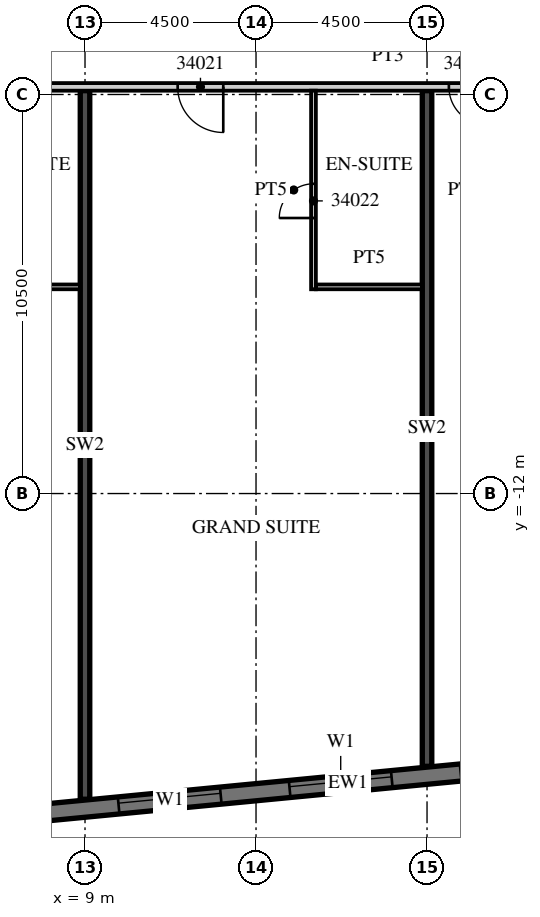
"""IFC4 building model, lengths in metres.
Left out: names, types, materials, properties, quantities, classifications, styles, units other than length and angle.
Written with IfcOpenShell. Run it as: python <this file> out.ifc"""

import sys

from ifc_helpers import new_model, si_unit, direction, frame, frame_2d, origin, place, context, subcontext, project, spatial, rectangle, extrude, element, fill, save


model = new_model("IFC4")
c1 = context("Model", 3, precision=1e-05, world=origin(), true_north=direction((0.0, 1.0)))
c2 = subcontext(c1, "Body", "Model", "MODEL_VIEW")
j1 = project(units=[si_unit("LENGTHUNIT", "METRE"), si_unit("PLANEANGLEUNIT", "RADIAN")], contexts=[c1])
p1 = place(None, origin())
s1 = spatial("IfcSite", under=j1, at=p1, CompositionType="ELEMENT")
p2 = place(p1, origin())
s2 = spatial("IfcBuilding", under=s1, at=p2, CompositionType="ELEMENT")
p3 = place(p2, frame((0.0, 0.0, 147.1)))
s3 = spatial("IfcBuildingStorey", under=s2, at=p3, CompositionType="ELEMENT", Elevation=147.1)
p4 = place(p3, frame((9.0, -20.044, 0.0), z_axis=(0.0, 0.0, 1.0), x_axis=(0.0, 1.0, 0.0)))
e1 = element("IfcWall", 1, at=p4, inside=s3, PredefinedType="SHEAR", context=c2, shape_type="SweptSolid", body=[
    extrude(rectangle(XDim=18.644, YDim=0.25, at=frame_2d((9.322, 0.0))), origin(), (0.0, 0.0, 1.0), 3.0),
])
p5 = place(p3, frame((18.0, -19.177, 0.0), z_axis=(0.0, 0.0, 1.0), x_axis=(0.0, 1.0, 0.0)))
e2 = element("IfcWall", 2, at=p5, inside=s3, PredefinedType="SHEAR", context=c2, shape_type="SweptSolid", body=[
    extrude(rectangle(XDim=17.777, YDim=0.25, at=frame_2d((8.889, 0.0))), origin(), (0.0, 0.0, 1.0), 3.0),
])
p6 = place(p3, frame((-13.521, -22.46, 0.0), z_axis=(0.0, 0.0, 1.0), x_axis=(0.995396096335, 0.095846812164, 0.0)))
e3 = element("IfcWall", 3, at=p6, inside=s3, PredefinedType="SOLIDWALL", context=c2, shape_type="SweptSolid", body=[
    extrude(rectangle(XDim=59.151, YDim=0.45, at=frame_2d((29.575, 0.0))), origin(), (0.0, 0.0, 1.0), 3.0),
])
p7 = place(p6, frame((0.91, 0.0, 0.45)))
e4 = element("IfcOpeningElement", 4, at=p7, cuts=e3, PredefinedType="OPENING", context=c2, shape_type="SweptSolid", body=[
    extrude(rectangle(XDim=2.7, YDim=2.25, at=frame_2d((1.35, 1.125))), frame((0.0, 0.235, 0.0), z_axis=(0.0, -1.0, 0.0), x_axis=(1.0, 0.0, 0.0)), (0.0, 0.0, 1.0), 0.47),
])
p8 = place(p6, frame((5.431, 0.0, 0.45)))
e5 = element("IfcOpeningElement", 5, at=p8, cuts=e3, PredefinedType="OPENING", context=c2, shape_type="SweptSolid", body=[
    extrude(rectangle(XDim=2.7, YDim=2.25, at=frame_2d((1.35, 1.125))), frame((0.0, 0.235, 0.0), z_axis=(0.0, -1.0, 0.0), x_axis=(1.0, 0.0, 0.0)), (0.0, 0.0, 1.0), 0.47),
])
p9 = place(p6, frame((9.952, 0.0, 0.45)))
e6 = element("IfcOpeningElement", 6, at=p9, cuts=e3, PredefinedType="OPENING", context=c2, shape_type="SweptSolid", body=[
    extrude(rectangle(XDim=2.7, YDim=2.25, at=frame_2d((1.35, 1.125))), frame((0.0, 0.235, 0.0), z_axis=(0.0, -1.0, 0.0), x_axis=(1.0, 0.0, 0.0)), (0.0, 0.0, 1.0), 0.47),
])
p10 = place(p6, frame((14.473, 0.0, 0.45)))
e7 = element("IfcOpeningElement", 7, at=p10, cuts=e3, PredefinedType="OPENING", context=c2, shape_type="SweptSolid", body=[
    extrude(rectangle(XDim=2.7, YDim=2.25, at=frame_2d((1.35, 1.125))), frame((0.0, 0.235, 0.0), z_axis=(0.0, -1.0, 0.0), x_axis=(1.0, 0.0, 0.0)), (0.0, 0.0, 1.0), 0.47),
])
p11 = place(p6, frame((18.994, 0.0, 0.45)))
e8 = element("IfcOpeningElement", 8, at=p11, cuts=e3, PredefinedType="OPENING", context=c2, shape_type="SweptSolid", body=[
    extrude(rectangle(XDim=2.7, YDim=2.25, at=frame_2d((1.35, 1.125))), frame((0.0, 0.235, 0.0), z_axis=(0.0, -1.0, 0.0), x_axis=(1.0, 0.0, 0.0)), (0.0, 0.0, 1.0), 0.47),
])
p12 = place(p6, frame((23.514, 0.0, 0.45)))
e9 = element("IfcOpeningElement", 9, at=p12, cuts=e3, PredefinedType="OPENING", context=c2, shape_type="SweptSolid", body=[
    extrude(rectangle(XDim=2.7, YDim=2.25, at=frame_2d((1.35, 1.125))), frame((0.0, 0.235, 0.0), z_axis=(0.0, -1.0, 0.0), x_axis=(1.0, 0.0, 0.0)), (0.0, 0.0, 1.0), 0.47),
])
p13 = place(p6, frame((28.035, 0.0, 0.45)))
e10 = element("IfcOpeningElement", 10, at=p13, cuts=e3, PredefinedType="OPENING", context=c2, shape_type="SweptSolid", body=[
    extrude(rectangle(XDim=2.7, YDim=2.25, at=frame_2d((1.35, 1.125))), frame((0.0, 0.235, 0.0), z_axis=(0.0, -1.0, 0.0), x_axis=(1.0, 0.0, 0.0)), (0.0, 0.0, 1.0), 0.47),
])
p14 = place(p6, frame((32.556, 0.0, 0.45)))
e11 = element("IfcOpeningElement", 11, at=p14, cuts=e3, PredefinedType="OPENING", context=c2, shape_type="SweptSolid", body=[
    extrude(rectangle(XDim=2.7, YDim=2.25, at=frame_2d((1.35, 1.125))), frame((0.0, 0.235, 0.0), z_axis=(0.0, -1.0, 0.0), x_axis=(1.0, 0.0, 0.0)), (0.0, 0.0, 1.0), 0.47),
])
p15 = place(p6, frame((37.077, 0.0, 0.45)))
e12 = element("IfcOpeningElement", 12, at=p15, cuts=e3, PredefinedType="OPENING", context=c2, shape_type="SweptSolid", body=[
    extrude(rectangle(XDim=2.7, YDim=2.25, at=frame_2d((1.35, 1.125))), frame((0.0, 0.235, 0.0), z_axis=(0.0, -1.0, 0.0), x_axis=(1.0, 0.0, 0.0)), (0.0, 0.0, 1.0), 0.47),
])
p16 = place(p6, frame((41.598, 0.0, 0.45)))
e13 = element("IfcOpeningElement", 13, at=p16, cuts=e3, PredefinedType="OPENING", context=c2, shape_type="SweptSolid", body=[
    extrude(rectangle(XDim=2.7, YDim=2.25, at=frame_2d((1.35, 1.125))), frame((0.0, 0.235, 0.0), z_axis=(0.0, -1.0, 0.0), x_axis=(1.0, 0.0, 0.0)), (0.0, 0.0, 1.0), 0.47),
])
p17 = place(p6, frame((46.118, 0.0, 0.45)))
e14 = element("IfcOpeningElement", 14, at=p17, cuts=e3, PredefinedType="OPENING", context=c2, shape_type="SweptSolid", body=[
    extrude(rectangle(XDim=2.7, YDim=2.25, at=frame_2d((1.35, 1.125))), frame((0.0, 0.235, 0.0), z_axis=(0.0, -1.0, 0.0), x_axis=(1.0, 0.0, 0.0)), (0.0, 0.0, 1.0), 0.47),
])
p18 = place(p6, frame((50.639, 0.0, 0.45)))
e15 = element("IfcOpeningElement", 15, at=p18, cuts=e3, PredefinedType="OPENING", context=c2, shape_type="SweptSolid", body=[
    extrude(rectangle(XDim=2.7, YDim=2.25, at=frame_2d((1.35, 1.125))), frame((0.0, 0.235, 0.0), z_axis=(0.0, -1.0, 0.0), x_axis=(1.0, 0.0, 0.0)), (0.0, 0.0, 1.0), 0.47),
])
p19 = place(p6, frame((55.15, 0.0, 0.45)))
e16 = element("IfcOpeningElement", 16, at=p19, cuts=e3, PredefinedType="OPENING", context=c2, shape_type="SweptSolid", body=[
    extrude(rectangle(XDim=2.7, YDim=2.25, at=frame_2d((1.35, 1.125))), frame((0.0, 0.235, 0.0), z_axis=(0.0, -1.0, 0.0), x_axis=(1.0, 0.0, 0.0)), (0.0, 0.0, 1.0), 0.47),
])
p20 = place(p3, frame((-13.5, -1.3, 0.0), z_axis=(0.0, 0.0, 1.0), x_axis=(1.0, 0.0, 0.0)))
e17 = element("IfcWall", 17, at=p20, inside=s3, PredefinedType="PARTITIONING", context=c2, shape_type="SweptSolid", body=[
    extrude(rectangle(XDim=60.932, YDim=0.2, at=frame_2d((30.466, 0.0))), origin(), (0.0, 0.0, 1.0), 3.0),
])
p21 = place(p20, frame((2.925, 0.0, 0.0)))
e18 = element("IfcOpeningElement", 18, at=p21, cuts=e17, PredefinedType="OPENING", context=c2, shape_type="SweptSolid", body=[
    extrude(rectangle(XDim=1.0, YDim=2.1, at=frame_2d((0.5, 1.05))), frame((0.0, 0.11, 0.0), z_axis=(0.0, -1.0, 0.0), x_axis=(1.0, 0.0, 0.0)), (0.0, 0.0, 1.0), 0.22),
])
p22 = place(p20, frame((6.938, 0.0, 0.0)))
e19 = element("IfcOpeningElement", 19, at=p22, cuts=e17, PredefinedType="OPENING", context=c2, shape_type="SweptSolid", body=[
    extrude(rectangle(XDim=1.2, YDim=2.1, at=frame_2d((0.6, 1.05))), frame((0.0, 0.11, 0.0), z_axis=(0.0, -1.0, 0.0), x_axis=(1.0, 0.0, 0.0)), (0.0, 0.0, 1.0), 0.22),
])
p23 = place(p20, frame((15.938, 0.0, 0.0)))
e20 = element("IfcOpeningElement", 20, at=p23, cuts=e17, PredefinedType="OPENING", context=c2, shape_type="SweptSolid", body=[
    extrude(rectangle(XDim=1.2, YDim=2.1, at=frame_2d((0.6, 1.05))), frame((0.0, 0.11, 0.0), z_axis=(0.0, -1.0, 0.0), x_axis=(1.0, 0.0, 0.0)), (0.0, 0.0, 1.0), 0.22),
])
p24 = place(p20, frame((24.938, 0.0, 0.0)))
e21 = element("IfcOpeningElement", 21, at=p24, cuts=e17, PredefinedType="OPENING", context=c2, shape_type="SweptSolid", body=[
    extrude(rectangle(XDim=1.2, YDim=2.1, at=frame_2d((0.6, 1.05))), frame((0.0, 0.11, 0.0), z_axis=(0.0, -1.0, 0.0), x_axis=(1.0, 0.0, 0.0)), (0.0, 0.0, 1.0), 0.22),
])
p25 = place(p20, frame((32.075, 0.0, 0.0)))
e22 = element("IfcOpeningElement", 22, at=p25, cuts=e17, PredefinedType="OPENING", context=c2, shape_type="SweptSolid", body=[
    extrude(rectangle(XDim=1.0, YDim=2.1, at=frame_2d((0.5, 1.05))), frame((0.0, 0.11, 0.0), z_axis=(0.0, -1.0, 0.0), x_axis=(1.0, 0.0, 0.0)), (0.0, 0.0, 1.0), 0.22),
])
p26 = place(p20, frame((36.55, 0.0, 0.0)))
e23 = element("IfcOpeningElement", 23, at=p26, cuts=e17, PredefinedType="OPENING", context=c2, shape_type="SweptSolid", body=[
    extrude(rectangle(XDim=1.0, YDim=2.1, at=frame_2d((0.5, 1.05))), frame((0.0, 0.11, 0.0), z_axis=(0.0, -1.0, 0.0), x_axis=(1.0, 0.0, 0.0)), (0.0, 0.0, 1.0), 0.22),
])
p27 = place(p20, frame((42.938, 0.0, 0.0)))
e24 = element("IfcOpeningElement", 24, at=p27, cuts=e17, PredefinedType="OPENING", context=c2, shape_type="SweptSolid", body=[
    extrude(rectangle(XDim=1.2, YDim=2.1, at=frame_2d((0.6, 1.05))), frame((0.0, 0.11, 0.0), z_axis=(0.0, -1.0, 0.0), x_axis=(1.0, 0.0, 0.0)), (0.0, 0.0, 1.0), 0.22),
])
p28 = place(p20, frame((52.425, 0.0, 0.0)))
e25 = element("IfcOpeningElement", 25, at=p28, cuts=e17, PredefinedType="OPENING", context=c2, shape_type="SweptSolid", body=[
    extrude(rectangle(XDim=1.0, YDim=2.1, at=frame_2d((0.5, 1.05))), frame((0.0, 0.11, 0.0), z_axis=(0.0, -1.0, 0.0), x_axis=(1.0, 0.0, 0.0)), (0.0, 0.0, 1.0), 0.22),
])
p29 = place(p20, frame((58.316, 0.0, 0.0)))
e26 = element("IfcOpeningElement", 26, at=p29, cuts=e17, PredefinedType="OPENING", context=c2, shape_type="SweptSolid", body=[
    extrude(rectangle(XDim=1.2, YDim=2.1, at=frame_2d((0.6, 1.05))), frame((0.0, 0.11, 0.0), z_axis=(0.0, -1.0, 0.0), x_axis=(1.0, 0.0, 0.0)), (0.0, 0.0, 1.0), 0.22),
])
p30 = place(p3, frame((6.075, -6.562, 0.0), z_axis=(0.0, 0.0, 1.0), x_axis=(1.0, 0.0, 0.0)))
e27 = element("IfcWall", 27, at=p30, inside=s3, PredefinedType="PARTITIONING", context=c2, shape_type="SweptSolid", body=[
    extrude(rectangle(XDim=2.8, YDim=0.125, at=frame_2d((1.4, 0.0))), origin(), (0.0, 0.0, 1.0), 3.0),
])
p31 = place(p3, frame((15.012, -6.625, 0.0), z_axis=(0.0, 0.0, 1.0), x_axis=(0.0, 1.0, 0.0)))
e28 = element("IfcWall", 28, at=p31, inside=s3, PredefinedType="PARTITIONING", context=c2, shape_type="SweptSolid", body=[
    extrude(rectangle(XDim=5.225, YDim=0.125, at=frame_2d((2.613, 0.0))), origin(), (0.0, 0.0, 1.0), 3.0),
])
p32 = place(p31, frame((1.875, 0.0, 0.0)))
e29 = element("IfcOpeningElement", 29, at=p32, cuts=e28, PredefinedType="OPENING", context=c2, shape_type="SweptSolid", body=[
    extrude(rectangle(XDim=0.9, YDim=2.1, at=frame_2d((0.45, 1.05))), frame((0.0, 0.073, 0.0), z_axis=(0.0, -1.0, 0.0), x_axis=(1.0, 0.0, 0.0)), (0.0, 0.0, 1.0), 0.145),
])
p33 = place(p3, frame((15.075, -6.562, 0.0), z_axis=(0.0, 0.0, 1.0), x_axis=(1.0, 0.0, 0.0)))
e30 = element("IfcWall", 30, at=p33, inside=s3, PredefinedType="PARTITIONING", context=c2, shape_type="SweptSolid", body=[
    extrude(rectangle(XDim=2.8, YDim=0.125, at=frame_2d((1.4, 0.0))), origin(), (0.0, 0.0, 1.0), 3.0),
])
p34 = place(p12, origin())
e31 = element("IfcWindow", 31, at=p34, inside=s3, PartitioningType="SINGLE_PANEL", PredefinedType="WINDOW", context=c2, shape_type="SweptSolid", body=[
    extrude(rectangle(XDim=2.7, YDim=2.25, at=frame_2d((1.35, 1.125))), frame((0.0, 0.09, 0.0), z_axis=(0.0, -1.0, 0.0), x_axis=(1.0, 0.0, 0.0)), (0.0, 0.0, 1.0), 0.06),
])
fill(e9, e31)
p35 = place(p13, origin())
e32 = element("IfcWindow", 32, at=p35, inside=s3, PartitioningType="SINGLE_PANEL", PredefinedType="WINDOW", context=c2, shape_type="SweptSolid", body=[
    extrude(rectangle(XDim=2.7, YDim=2.25, at=frame_2d((1.35, 1.125))), frame((0.0, 0.09, 0.0), z_axis=(0.0, -1.0, 0.0), x_axis=(1.0, 0.0, 0.0)), (0.0, 0.0, 1.0), 0.06),
])
fill(e10, e32)
p36 = place(p24, origin())
e33 = element("IfcDoor", 33, at=p36, inside=s3, OperationType="SINGLE_SWING_RIGHT", PredefinedType="DOOR", context=c2, shape_type="SweptSolid", body=[
    extrude(rectangle(XDim=1.2, YDim=2.1, at=frame_2d((0.6, 1.05))), frame((0.0, 0.025, 0.0), z_axis=(0.0, -1.0, 0.0), x_axis=(1.0, 0.0, 0.0)), (0.0, 0.0, 1.0), 0.05),
])
fill(e21, e33)
p37 = place(p32, origin())
e34 = element("IfcDoor", 34, at=p37, inside=s3, OperationType="SINGLE_SWING_LEFT", PredefinedType="DOOR", context=c2, shape_type="SweptSolid", body=[
    extrude(rectangle(XDim=0.9, YDim=2.1, at=frame_2d((0.45, 1.05))), frame((0.0, 0.025, 0.0), z_axis=(0.0, -1.0, 0.0), x_axis=(1.0, 0.0, 0.0)), (0.0, 0.0, 1.0), 0.05),
])
fill(e29, e34)
p38 = place(p25, origin())
e35 = element("IfcDoor", 35, at=p38, inside=s3, OperationType="SINGLE_SWING_RIGHT", PredefinedType="DOOR", context=c2, shape_type="SweptSolid", body=[
    extrude(rectangle(XDim=1.0, YDim=2.1, at=frame_2d((0.5, 1.05))), frame((0.0, 0.025, 0.0), z_axis=(0.0, -1.0, 0.0), x_axis=(1.0, 0.0, 0.0)), (0.0, 0.0, 1.0), 0.05),
])
fill(e22, e35)
save(model, sys.argv[1])
